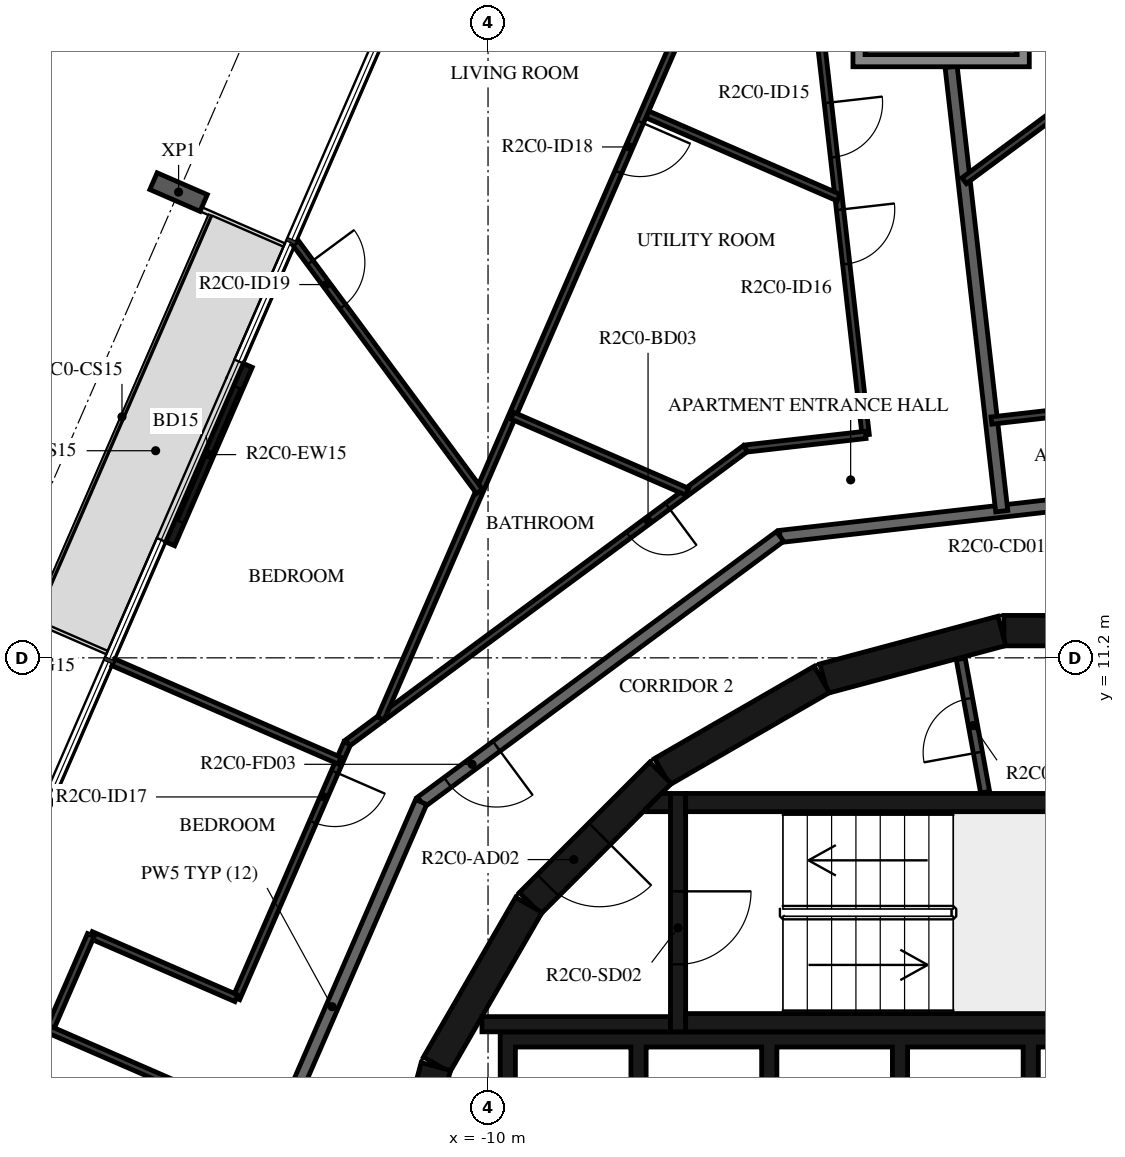
"""IFC4 building model, lengths in metres.
Left out: names, types, materials, properties, quantities, classifications, styles, units other than length and angle.
Written with IfcOpenShell. Run it as: python <this file> out.ifc"""

import sys

from ifc_helpers import new_model, si_unit, direction, frame, frame_2d, origin, origin_2d, place, context, subcontext, project, spatial, polyline, rectangle, i_section, outline, extrude, element, fill, save


model = new_model("IFC4")
c1 = context("Model", 3, precision=1e-05, world=origin(), true_north=direction((0.0, 1.0)))
c2 = subcontext(c1, "Body", "Model", "MODEL_VIEW")
j1 = project(units=[si_unit("LENGTHUNIT", "METRE"), si_unit("PLANEANGLEUNIT", "RADIAN")], contexts=[c1])
p1 = place(None, origin())
s1 = spatial("IfcSite", under=j1, at=p1, CompositionType="ELEMENT")
p2 = place(p1, origin())
s2 = spatial("IfcBuilding", under=s1, at=p2, CompositionType="ELEMENT")
p3 = place(p2, frame((0.0, 0.0, 97.7)))
s3 = spatial("IfcBuildingStorey", under=s2, at=p3, CompositionType="ELEMENT", Elevation=97.7)
p4 = place(p3, frame((-15.089, 18.859, -0.38), z_axis=(0.0, 0.0, 1.0), x_axis=(0.398749038162, 0.917060087761, 0.0)))
e1 = element("IfcColumn", 1, at=p4, inside=s3, PredefinedType="COLUMN", context=c2, shape_type="SweptSolid", body=[
    extrude(i_section(OverallWidth=0.3, OverallDepth=0.9, WebThickness=0.019, FlangeThickness=0.035, FilletRadius=0.03, at=origin_2d()), origin(), (0.0, 0.0, 1.0), 3.5),
])
p5 = place(p3, frame((-13.951, 16.01, 0.0), z_axis=(0.0, 0.0, 1.0), x_axis=(-0.398720531764, -0.917072482168, 0.0)))
e2 = element("IfcWall", 2, at=p5, inside=s3, PredefinedType="STANDARD", context=c2, shape_type="SweptSolid", body=[
    extrude(rectangle(XDim=3.2, YDim=0.16, at=frame_2d((1.6, 0.0))), origin(), (0.0, 0.0, 1.0), 3.12),
])
p6 = place(p5, frame((0.4, 0.0, 0.0)))
e3 = element("IfcOpeningElement", 3, at=p6, cuts=e2, PredefinedType="OPENING", context=c2, shape_type="SweptSolid", body=[
    extrude(rectangle(XDim=2.4, YDim=2.4, at=frame_2d((1.2, 1.2))), frame((0.0, 0.09, 0.0), z_axis=(0.0, -1.0, 0.0), x_axis=(1.0, 0.0, 0.0)), (0.0, 0.0, 1.0), 0.18),
])
for number, where, z_axis, x_axis in (
    (4, (1.516, 11.647, 0.0), (0.0, 0.0, 1.0), (-1.0, 0.0, 0.0)),
    (5, (-1.55, 11.643, 0.0), (0.0, 0.0, 1.0), (-0.966, -0.259, 0.0)),
    (6, (-4.51, 10.845, 0.0), (0.0, 0.0, 1.0), (-0.866, -0.5, 0.0)),
):
    element("IfcWall", number, at=place(p3, frame(where, z_axis=z_axis, x_axis=x_axis)), inside=s3, PredefinedType="SHEAR", context=c2, shape_type="SweptSolid", body=[
        extrude(rectangle(XDim=3.033, YDim=0.5, at=frame_2d((1.516, 0.0))), origin(), (0.0, 0.0, 1.0), 3.12),
    ])
p7 = place(p3, frame((-7.164, 9.308, 0.0), z_axis=(0.0, 0.0, 1.0), x_axis=(-0.707106781187, -0.707106781187, 0.0)))
e7 = element("IfcWall", 7, at=p7, inside=s3, PredefinedType="SHEAR", context=c2, shape_type="SweptSolid", body=[
    extrude(rectangle(XDim=3.032, YDim=0.5, at=frame_2d((1.516, 0.0))), origin(), (0.0, 0.0, 1.0), 3.12),
])
p8 = place(p7, frame((1.416, 0.0, 0.0)))
e8 = element("IfcOpeningElement", 8, at=p8, cuts=e7, PredefinedType="OPENING", context=c2, shape_type="SweptSolid", body=[
    extrude(rectangle(XDim=1.2, YDim=2.1, at=frame_2d((0.6, 1.05))), frame((0.0, 0.26, 0.0), z_axis=(0.0, -1.0, 0.0), x_axis=(1.0, 0.0, 0.0)), (0.0, 0.0, 1.0), 0.52),
])
for number, where, z_axis, x_axis in (
    (9, (-9.329, 7.137, 0.0), (0.0, 0.0, 1.0), (-0.5, -0.866, 0.0)),
    (10, (-10.858, 4.479, 0.0), (0.0, 0.0, 1.0), (-0.259, -0.966, 0.0)),
):
    element("IfcWall", number, at=place(p3, frame(where, z_axis=z_axis, x_axis=x_axis)), inside=s3, PredefinedType="SHEAR", context=c2, shape_type="SweptSolid", body=[
        extrude(rectangle(XDim=3.033, YDim=0.5, at=frame_2d((1.516, 0.0))), origin(), (0.0, 0.0, 1.0), 3.12),
    ])
for number, where, z_axis, x_axis in (
    (11, (-6.75, 5.2, 0.0), (0.0, 0.0, 1.0), (1.0, 0.0, 0.0)),
    (12, (-6.75, 8.82, 0.0), (0.0, 0.0, 1.0), (1.0, 0.0, 0.0)),
):
    element("IfcWall", number, at=place(p3, frame(where, z_axis=z_axis, x_axis=x_axis)), inside=s3, PredefinedType="SHEAR", context=c2, shape_type="SweptSolid", body=[
        extrude(rectangle(XDim=6.75, YDim=0.3, at=frame_2d((3.375, 0.0))), origin(), (0.0, 0.0, 1.0), 3.12),
    ])
p9 = place(p3, frame((-6.875, 8.97, 0.0), z_axis=(0.0, 0.0, 1.0), x_axis=(0.0, -1.0, 0.0)))
e13 = element("IfcWall", 13, at=p9, inside=s3, PredefinedType="SHEAR", context=c2, shape_type="SweptSolid", body=[
    extrude(rectangle(XDim=3.92, YDim=0.25, at=frame_2d((1.96, 0.0))), origin(), (0.0, 0.0, 1.0), 3.12),
])
p10 = place(p9, frame((1.61, 0.0, 0.0)))
e14 = element("IfcOpeningElement", 14, at=p10, cuts=e13, PredefinedType="OPENING", context=c2, shape_type="SweptSolid", body=[
    extrude(rectangle(XDim=1.2, YDim=2.1, at=frame_2d((0.6, 1.05))), frame((0.0, 0.135, 0.0), z_axis=(0.0, -1.0, 0.0), x_axis=(1.0, 0.0, 0.0)), (0.0, 0.0, 1.0), 0.27),
])
p11 = place(p3, frame((-7.0, 5.175, 0.0), z_axis=(0.0, 0.0, 1.0), x_axis=(-1.0, 0.0, 0.0)))
e15 = element("IfcWall", 15, at=p11, inside=s3, PredefinedType="SHEAR", context=c2, shape_type="SweptSolid", body=[
    extrude(rectangle(XDim=3.1, YDim=0.25, at=frame_2d((1.55, 0.0))), origin(), (0.0, 0.0, 1.0), 3.12),
])
p12 = place(p3, origin())
e16 = element("IfcWall", 16, at=p12, inside=s3, PredefinedType="SHEAR", context=c2, shape_type="SweptSolid", body=[
    extrude(outline(polyline([(-7.148, 8.97), (-7.0, 8.97), (-7.0, 8.67), (-7.448, 8.67), (-7.148, 8.97)])), origin(), (0.0, 0.0, 1.0), 3.12),
])
p13 = place(p3, origin())
e17 = element("IfcWall", 17, at=p13, inside=s3, PredefinedType="SHEAR", context=c2, shape_type="SweptSolid", body=[
    extrude(outline(polyline([(-9.55, 4.8), (-7.65, 4.8), (-7.65, 1.9), (-7.4, 1.9), (-7.4, 4.8), (-5.5, 4.8), (-5.5, 1.9), (-5.25, 1.9), (-5.25, 4.8), (-3.35, 4.8), (-3.35, 1.9), (-3.1, 1.9), (-3.1, 4.8), (-1.2, 4.8), (-1.2, 1.9), (-0.95, 1.9), (-0.95, 4.8), (0.95, 4.8), (0.95, 1.9), (1.2, 1.9), (1.2, 4.8), (3.1, 4.8), (3.1, 1.9), (3.35, 1.9), (3.35, 4.8), (5.25, 4.8), (5.25, 1.9), (5.5, 1.9), (5.5, 4.8), (7.4, 4.8), (7.4, 1.9), (7.65, 1.9), (7.65, 4.8), (9.55, 4.8), (9.55, 1.9), (9.8, 1.9), (9.8, 4.8), (9.8, 5.05), (-9.8, 5.05), (-9.8, 4.8), (-9.8, 1.9), (-9.55, 1.9), (-9.55, 4.8)])), origin(), (0.0, 0.0, 1.0), 3.12),
])
p14 = place(p3, frame((-1.825, 8.99, 0.0), z_axis=(0.0, 0.0, 1.0), x_axis=(-0.179955206115, 0.983674805915, 0.0)))
e18 = element("IfcWall", 18, at=p14, inside=s3, PredefinedType="PARTITIONING", context=c2, shape_type="SweptSolid", body=[
    extrude(rectangle(XDim=2.229, YDim=0.15, at=frame_2d((1.115, 0.0))), origin(), (0.0, 0.0, 1.0), 3.12),
])
p15 = place(p14, frame((0.665, 0.0, 0.0)))
e19 = element("IfcOpeningElement", 19, at=p15, cuts=e18, PredefinedType="OPENING", context=c2, shape_type="SweptSolid", body=[
    extrude(rectangle(XDim=0.9, YDim=2.1, at=frame_2d((0.45, 1.05))), frame((0.0, 0.085, 0.0), z_axis=(0.0, -1.0, 0.0), x_axis=(1.0, 0.0, 0.0)), (0.0, 0.0, 1.0), 0.17),
])
p16 = place(p3, frame((2.096, 14.028, 0.0), z_axis=(0.0, 0.0, 1.0), x_axis=(-0.993569170114, -0.113226782163, 0.0)))
e20 = element("IfcWall", 20, at=p16, inside=s3, PredefinedType="STANDARD", context=c2, shape_type="SweptSolid", body=[
    extrude(rectangle(XDim=7.342, YDim=0.2, at=frame_2d((3.671, 0.0))), origin(), (0.0, 0.0, 1.0), 3.12),
])
p17 = place(p3, frame((-5.198, 13.196, 0.0), z_axis=(0.0, 0.0, 1.0), x_axis=(-0.803869883159, -0.594805187394, 0.0)))
e21 = element("IfcWall", 21, at=p17, inside=s3, PredefinedType="STANDARD", context=c2, shape_type="SweptSolid", body=[
    extrude(rectangle(XDim=7.342, YDim=0.2, at=frame_2d((3.671, 0.0))), origin(), (0.0, 0.0, 1.0), 3.12),
])
p18 = place(p17, frame((5.8, 0.0, 0.0)))
e22 = element("IfcOpeningElement", 22, at=p18, cuts=e21, PredefinedType="OPENING", context=c2, shape_type="SweptSolid", body=[
    extrude(rectangle(XDim=1.0, YDim=2.1, at=frame_2d((0.5, 1.05))), frame((0.0, 0.11, 0.0), z_axis=(0.0, -1.0, 0.0), x_axis=(1.0, 0.0, 0.0)), (0.0, 0.0, 1.0), 0.22),
])
p19 = place(p3, frame((-11.1, 8.829, 0.0), z_axis=(0.0, 0.0, 1.0), x_axis=(-0.398741918631, -0.917063183388, 0.0)))
e23 = element("IfcWall", 23, at=p19, inside=s3, PredefinedType="STANDARD", context=c2, shape_type="SweptSolid", body=[
    extrude(rectangle(XDim=7.342, YDim=0.2, at=frame_2d((3.671, 0.0))), origin(), (0.0, 0.0, 1.0), 3.12),
])
p20 = place(p3, frame((-2.385, 20.92, 0.0), z_axis=(0.0, 0.0, 1.0), x_axis=(0.113177776247, -0.993574753586, 0.0)))
e24 = element("IfcWall", 24, at=p20, inside=s3, PredefinedType="STANDARD", context=c2, shape_type="SweptSolid", body=[
    extrude(rectangle(XDim=7.356, YDim=0.2, at=frame_2d((3.678, 0.0))), origin(), (0.0, 0.0, 1.0), 3.12),
])
p21 = place(p3, frame((-19.159, 4.231, 0.0), z_axis=(0.0, 0.0, 1.0), x_axis=(0.917067157668, -0.398732778095, 0.0)))
e25 = element("IfcWall", 25, at=p21, inside=s3, PredefinedType="STANDARD", context=c2, shape_type="SweptSolid", body=[
    extrude(rectangle(XDim=4.017, YDim=0.2, at=frame_2d((2.009, 0.0))), origin(), (0.0, 0.0, 1.0), 2.73),
])
p22 = place(p3, frame((-0.175, 15.278, 0.0), z_axis=(0.0, 0.0, 1.0), x_axis=(-0.993575604955, -0.113170301923, 0.0)))
e26 = element("IfcWall", 26, at=p22, inside=s3, PredefinedType="PARTITIONING", context=c2, shape_type="SweptSolid", body=[
    extrude(rectangle(XDim=1.555, YDim=0.12, at=frame_2d((0.778, 0.0))), origin(), (0.0, 0.0, 1.0), 3.12),
])
p23 = place(p3, frame((2.068, 22.183, 0.0), z_axis=(0.0, 0.0, 1.0), x_axis=(-0.803867138365, -0.594808896921, 0.0)))
e27 = element("IfcWall", 27, at=p23, inside=s3, PredefinedType="PARTITIONING", context=c2, shape_type="SweptSolid", body=[
    extrude(rectangle(XDim=5.273, YDim=0.12, at=frame_2d((2.636, 0.0))), origin(), (0.0, 0.0, 1.0), 3.12),
])
p24 = place(p23, frame((0.6, 0.0, 0.0)))
e28 = element("IfcOpeningElement", 28, at=p24, cuts=e27, PredefinedType="OPENING", context=c2, shape_type="SweptSolid", body=[
    extrude(rectangle(XDim=0.9, YDim=2.1, at=frame_2d((0.45, 1.05))), frame((0.0, 0.07, 0.0), z_axis=(0.0, -1.0, 0.0), x_axis=(1.0, 0.0, 0.0)), (0.0, 0.0, 1.0), 0.14),
])
p25 = place(p3, frame((-5.04, 25.844, 0.0), z_axis=(0.0, 0.0, 1.0), x_axis=(0.1132106553, -0.993571007793, 0.0)))
e29 = element("IfcWall", 29, at=p25, inside=s3, PredefinedType="PARTITIONING", context=c2, shape_type="SweptSolid", body=[
    extrude(rectangle(XDim=11.048, YDim=0.12, at=frame_2d((5.524, 0.0))), origin(), (0.0, 0.0, 1.0), 3.12),
])
p26 = place(p25, frame((5.551, 0.0, 0.0)))
e30 = element("IfcOpeningElement", 30, at=p26, cuts=e29, PredefinedType="OPENING", context=c2, shape_type="SweptSolid", body=[
    extrude(rectangle(XDim=0.9, YDim=2.1, at=frame_2d((0.45, 1.05))), frame((0.0, 0.07, 0.0), z_axis=(0.0, -1.0, 0.0), x_axis=(1.0, 0.0, 0.0)), (0.0, 0.0, 1.0), 0.14),
])
p27 = place(p25, frame((7.32, 0.0, 0.0)))
e31 = element("IfcOpeningElement", 31, at=p27, cuts=e29, PredefinedType="OPENING", context=c2, shape_type="SweptSolid", body=[
    extrude(rectangle(XDim=0.9, YDim=2.1, at=frame_2d((0.45, 1.05))), frame((0.0, 0.07, 0.0), z_axis=(0.0, -1.0, 0.0), x_axis=(1.0, 0.0, 0.0)), (0.0, 0.0, 1.0), 0.14),
])
p28 = place(p3, frame((-3.79, 14.867, 0.0), z_axis=(0.0, 0.0, 1.0), x_axis=(-0.993557948123, -0.113325212204, 0.0)))
e32 = element("IfcWall", 32, at=p28, inside=s3, PredefinedType="PARTITIONING", context=c2, shape_type="SweptSolid", body=[
    extrude(rectangle(XDim=1.991, YDim=0.12, at=frame_2d((0.995, 0.0))), origin(), (0.0, 0.0, 1.0), 3.12),
])
p29 = place(p3, frame((-5.767, 14.641, 0.0), z_axis=(0.0, 0.0, 1.0), x_axis=(-0.803853364238, -0.594827511807, 0.0)))
e33 = element("IfcWall", 33, at=p29, inside=s3, PredefinedType="PARTITIONING", context=c2, shape_type="SweptSolid", body=[
    extrude(rectangle(XDim=8.146, YDim=0.12, at=frame_2d((4.073, 0.0))), origin(), (0.0, 0.0, 1.0), 3.12),
])
p30 = place(p29, frame((1.592, 0.0, 0.0)))
e34 = element("IfcOpeningElement", 34, at=p30, cuts=e33, PredefinedType="OPENING", context=c2, shape_type="SweptSolid", body=[
    extrude(rectangle(XDim=0.8, YDim=2.1, at=frame_2d((0.4, 1.05))), frame((0.0, 0.07, 0.0), z_axis=(0.0, -1.0, 0.0), x_axis=(1.0, 0.0, 0.0)), (0.0, 0.0, 1.0), 0.14),
])
p31 = place(p3, frame((-12.315, 9.796, 0.0), z_axis=(0.0, 0.0, 1.0), x_axis=(-0.398765150511, -0.917053081745, 0.0)))
e35 = element("IfcWall", 35, at=p31, inside=s3, PredefinedType="PARTITIONING", context=c2, shape_type="SweptSolid", body=[
    extrude(rectangle(XDim=4.573, YDim=0.12, at=frame_2d((2.287, 0.0))), origin(), (0.0, 0.0, 1.0), 3.12),
])
p32 = place(p31, frame((0.513, 0.0, 0.0)))
e36 = element("IfcOpeningElement", 36, at=p32, cuts=e35, PredefinedType="OPENING", context=c2, shape_type="SweptSolid", body=[
    extrude(rectangle(XDim=0.9, YDim=2.1, at=frame_2d((0.45, 1.05))), frame((0.0, 0.07, 0.0), z_axis=(0.0, -1.0, 0.0), x_axis=(1.0, 0.0, 0.0)), (0.0, 0.0, 1.0), 0.14),
])
p33 = place(p3, frame((-14.139, 5.602, 0.0), z_axis=(0.0, 0.0, 1.0), x_axis=(-0.91706559301, 0.398736376716, 0.0)))
e37 = element("IfcWall", 37, at=p33, inside=s3, PredefinedType="PARTITIONING", context=c2, shape_type="SweptSolid", body=[
    extrude(rectangle(XDim=2.609, YDim=0.12, at=frame_2d((1.304, 0.0))), origin(), (0.0, 0.0, 1.0), 3.12),
])
p34 = place(p3, frame((-16.531, 6.642, 0.0), z_axis=(0.0, 0.0, 1.0), x_axis=(-0.398783871208, -0.917044941137, 0.0)))
e38 = element("IfcWall", 38, at=p34, inside=s3, PredefinedType="PARTITIONING", context=c2, shape_type="SweptSolid", body=[
    extrude(rectangle(XDim=1.7, YDim=0.12, at=frame_2d((0.85, 0.0))), origin(), (0.0, 0.0, 1.0), 3.12),
])
p35 = place(p3, frame((-17.209, 5.083, 0.0), z_axis=(0.0, 0.0, 1.0), x_axis=(0.91706559301, -0.398736376716, 0.0)))
e39 = element("IfcWall", 39, at=p35, inside=s3, PredefinedType="PARTITIONING", context=c2, shape_type="SweptSolid", body=[
    extrude(rectangle(XDim=2.609, YDim=0.12, at=frame_2d((1.304, 0.0))), origin(), (0.0, 0.0, 1.0), 3.12),
])
p36 = place(p3, frame((-7.435, 20.161, 0.0), z_axis=(0.0, 0.0, 1.0), x_axis=(0.917055599503, -0.398759360291, 0.0)))
e40 = element("IfcWall", 40, at=p36, inside=s3, PredefinedType="PARTITIONING", context=c2, shape_type="SweptSolid", body=[
    extrude(rectangle(XDim=3.49, YDim=0.12, at=frame_2d((1.745, 0.0))), origin(), (0.0, 0.0, 1.0), 3.12),
])
p37 = place(p3, frame((-5.952, 23.571, 0.0), z_axis=(0.0, 0.0, 1.0), x_axis=(-0.398745097158, -0.917061801348, 0.0)))
e41 = element("IfcWall", 41, at=p37, inside=s3, PredefinedType="PARTITIONING", context=c2, shape_type="SweptSolid", body=[
    extrude(rectangle(XDim=14.576, YDim=0.12, at=frame_2d((7.288, 0.0))), origin(), (0.0, 0.0, 1.0), 3.12),
])
p38 = place(p37, frame((3.878, 0.0, 0.0)))
e42 = element("IfcOpeningElement", 42, at=p38, cuts=e41, PredefinedType="OPENING", context=c2, shape_type="SweptSolid", body=[
    extrude(rectangle(XDim=0.9, YDim=2.1, at=frame_2d((0.45, 1.05))), frame((0.0, 0.07, 0.0), z_axis=(0.0, -1.0, 0.0), x_axis=(1.0, 0.0, 0.0)), (0.0, 0.0, 1.0), 0.14),
])
p39 = place(p37, frame((0.2, 0.0, 0.0)))
e43 = element("IfcOpeningElement", 43, at=p39, cuts=e41, PredefinedType="OPENING", context=c2, shape_type="SweptSolid", body=[
    extrude(rectangle(XDim=0.9, YDim=2.1, at=frame_2d((0.45, 1.05))), frame((0.0, 0.07, 0.0), z_axis=(0.0, -1.0, 0.0), x_axis=(1.0, 0.0, 0.0)), (0.0, 0.0, 1.0), 0.14),
])
p40 = place(p3, frame((-9.6, 15.182, 0.0), z_axis=(0.0, 0.0, 1.0), x_axis=(0.917073771145, -0.398717567054, 0.0)))
e44 = element("IfcWall", 44, at=p40, inside=s3, PredefinedType="PARTITIONING", context=c2, shape_type="SweptSolid", body=[
    extrude(rectangle(XDim=3.135, YDim=0.12, at=frame_2d((1.567, 0.0))), origin(), (0.0, 0.0, 1.0), 3.12),
])
p41 = place(p3, frame((-13.163, 18.022, 0.0), z_axis=(0.0, 0.0, 1.0), x_axis=(0.594797671626, -0.803875444226, 0.0)))
e45 = element("IfcWall", 45, at=p41, inside=s3, PredefinedType="PARTITIONING", context=c2, shape_type="SweptSolid", body=[
    extrude(rectangle(XDim=5.081, YDim=0.12, at=frame_2d((2.54, 0.0))), origin(), (0.0, 0.0, 1.0), 3.12),
])
p42 = place(p41, frame((0.4, 0.0, 0.0)))
e46 = element("IfcOpeningElement", 46, at=p42, cuts=e45, PredefinedType="OPENING", context=c2, shape_type="SweptSolid", body=[
    extrude(rectangle(XDim=0.9, YDim=2.1, at=frame_2d((0.45, 1.05))), frame((0.0, 0.07, 0.0), z_axis=(0.0, -1.0, 0.0), x_axis=(1.0, 0.0, 0.0)), (0.0, 0.0, 1.0), 0.14),
])
p43 = place(p3, frame((-16.161, 11.126, 0.0), z_axis=(0.0, 0.0, 1.0), x_axis=(0.91705953326, -0.398750313425, 0.0)))
e47 = element("IfcWall", 47, at=p43, inside=s3, PredefinedType="PARTITIONING", context=c2, shape_type="SweptSolid", body=[
    extrude(rectangle(XDim=4.057, YDim=0.12, at=frame_2d((2.029, 0.0))), origin(), (0.0, 0.0, 1.0), 2.73),
])
p44 = place(p3, origin())
e48 = element("IfcWall", 48, at=p44, inside=s3, PredefinedType="STANDARD", context=c2, shape_type="SweptSolid", body=[
    extrude(outline(polyline([(-1.099, 23.82), (-1.099, 20.92), (-3.999, 20.92), (-3.999, 23.82), (-1.099, 23.82)]), holes=[polyline([(-3.799, 21.12), (-1.299, 21.12), (-1.299, 23.62), (-3.799, 23.62), (-3.799, 21.12)])]), origin(), (0.0, 0.0, 1.0), 3.12),
])
p45 = place(p6, origin())
e49 = element("IfcDoor", 49, at=p45, inside=s3, OperationType="DOUBLE_DOOR_SLIDING", PredefinedType="DOOR", context=c2, shape_type="SweptSolid", body=[
    extrude(rectangle(XDim=2.4, YDim=2.4, at=frame_2d((1.2, 1.2))), frame((0.0, 0.025, 0.0), z_axis=(0.0, -1.0, 0.0), x_axis=(1.0, 0.0, 0.0)), (0.0, 0.0, 1.0), 0.05),
])
fill(e3, e49)
p46 = place(p10, origin())
e50 = element("IfcDoor", 50, at=p46, inside=s3, OperationType="SINGLE_SWING_LEFT", PredefinedType="DOOR", context=c2, shape_type="SweptSolid", body=[
    extrude(rectangle(XDim=1.2, YDim=2.1, at=frame_2d((0.6, 1.05))), frame((0.0, 0.025, 0.0), z_axis=(0.0, -1.0, 0.0), x_axis=(1.0, 0.0, 0.0)), (0.0, 0.0, 1.0), 0.05),
])
fill(e14, e50)
p47 = place(p8, origin())
e51 = element("IfcDoor", 51, at=p47, inside=s3, OperationType="SINGLE_SWING_RIGHT", PredefinedType="DOOR", context=c2, shape_type="SweptSolid", body=[
    extrude(rectangle(XDim=1.2, YDim=2.1, at=frame_2d((0.6, 1.05))), frame((0.0, 0.025, 0.0), z_axis=(0.0, -1.0, 0.0), x_axis=(1.0, 0.0, 0.0)), (0.0, 0.0, 1.0), 0.05),
])
fill(e8, e51)
p48 = place(p15, origin())
e52 = element("IfcDoor", 52, at=p48, inside=s3, OperationType="SINGLE_SWING_RIGHT", PredefinedType="DOOR", context=c2, shape_type="SweptSolid", body=[
    extrude(rectangle(XDim=0.9, YDim=2.1, at=frame_2d((0.45, 1.05))), frame((0.0, 0.025, 0.0), z_axis=(0.0, -1.0, 0.0), x_axis=(1.0, 0.0, 0.0)), (0.0, 0.0, 1.0), 0.05),
])
fill(e19, e52)
p49 = place(p18, origin())
e53 = element("IfcDoor", 53, at=p49, inside=s3, OperationType="SINGLE_SWING_LEFT", PredefinedType="DOOR", context=c2, shape_type="SweptSolid", body=[
    extrude(rectangle(XDim=1.0, YDim=2.1, at=frame_2d((0.5, 1.05))), frame((0.0, 0.025, 0.0), z_axis=(0.0, -1.0, 0.0), x_axis=(1.0, 0.0, 0.0)), (0.0, 0.0, 1.0), 0.05),
])
fill(e22, e53)
p50 = place(p26, origin())
e54 = element("IfcDoor", 54, at=p50, inside=s3, OperationType="SINGLE_SWING_LEFT", PredefinedType="DOOR", context=c2, shape_type="SweptSolid", body=[
    extrude(rectangle(XDim=0.9, YDim=2.1, at=frame_2d((0.45, 1.05))), frame((0.0, 0.025, 0.0), z_axis=(0.0, -1.0, 0.0), x_axis=(1.0, 0.0, 0.0)), (0.0, 0.0, 1.0), 0.05),
])
fill(e30, e54)
p51 = place(p27, origin())
e55 = element("IfcDoor", 55, at=p51, inside=s3, OperationType="SINGLE_SWING_LEFT", PredefinedType="DOOR", context=c2, shape_type="SweptSolid", body=[
    extrude(rectangle(XDim=0.9, YDim=2.1, at=frame_2d((0.45, 1.05))), frame((0.0, 0.025, 0.0), z_axis=(0.0, -1.0, 0.0), x_axis=(1.0, 0.0, 0.0)), (0.0, 0.0, 1.0), 0.05),
])
fill(e31, e55)
p52 = place(p30, origin())
e56 = element("IfcDoor", 56, at=p52, inside=s3, OperationType="SINGLE_SWING_LEFT", PredefinedType="DOOR", context=c2, shape_type="SweptSolid", body=[
    extrude(rectangle(XDim=0.8, YDim=2.1, at=frame_2d((0.4, 1.05))), frame((0.0, 0.025, 0.0), z_axis=(0.0, -1.0, 0.0), x_axis=(1.0, 0.0, 0.0)), (0.0, 0.0, 1.0), 0.05),
])
fill(e34, e56)
p53 = place(p32, origin())
e57 = element("IfcDoor", 57, at=p53, inside=s3, OperationType="SINGLE_SWING_LEFT", PredefinedType="DOOR", context=c2, shape_type="SweptSolid", body=[
    extrude(rectangle(XDim=0.9, YDim=2.1, at=frame_2d((0.45, 1.05))), frame((0.0, 0.025, 0.0), z_axis=(0.0, -1.0, 0.0), x_axis=(1.0, 0.0, 0.0)), (0.0, 0.0, 1.0), 0.05),
])
fill(e36, e57)
p54 = place(p38, origin())
e58 = element("IfcDoor", 58, at=p54, inside=s3, OperationType="SINGLE_SWING_LEFT", PredefinedType="DOOR", context=c2, shape_type="SweptSolid", body=[
    extrude(rectangle(XDim=0.9, YDim=2.1, at=frame_2d((0.45, 1.05))), frame((0.0, 0.025, 0.0), z_axis=(0.0, -1.0, 0.0), x_axis=(1.0, 0.0, 0.0)), (0.0, 0.0, 1.0), 0.05),
])
fill(e42, e58)
p55 = place(p42, origin())
e59 = element("IfcDoor", 59, at=p55, inside=s3, OperationType="SINGLE_SWING_RIGHT", PredefinedType="DOOR", context=c2, shape_type="SweptSolid", body=[
    extrude(rectangle(XDim=0.9, YDim=2.1, at=frame_2d((0.45, 1.05))), frame((0.0, 0.025, 0.0), z_axis=(0.0, -1.0, 0.0), x_axis=(1.0, 0.0, 0.0)), (0.0, 0.0, 1.0), 0.05),
])
fill(e46, e59)
save(model, sys.argv[1])
